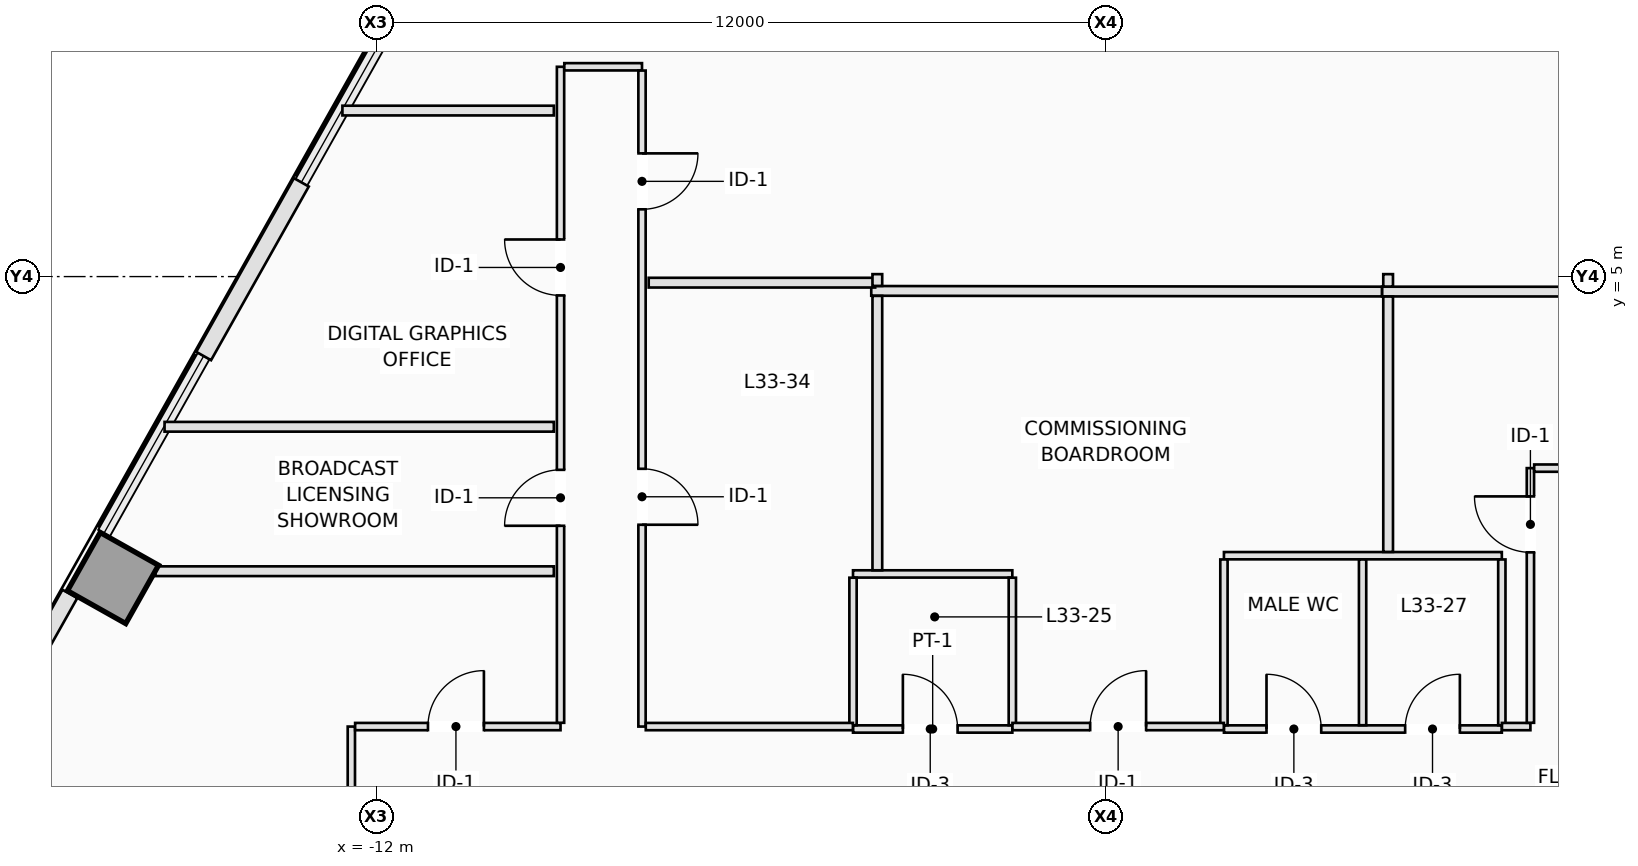
"""IFC4 building model, lengths in metres.
Left out: names, types, materials, properties, quantities, classifications, styles, units other than length and angle.
Written with IfcOpenShell. Run it as: python <this file> out.ifc"""

import sys

from ifc_helpers import new_model, si_unit, direction, frame, frame_2d, origin, origin_2d, place, context, subcontext, project, spatial, rectangle, extrude, element, fill, save


model = new_model("IFC4")
c1 = context("Model", 3, precision=1e-05, world=origin(), true_north=direction((0.0, 1.0)))
c2 = subcontext(c1, "Body", "Model", "MODEL_VIEW")
j1 = project(units=[si_unit("LENGTHUNIT", "METRE"), si_unit("PLANEANGLEUNIT", "RADIAN")], contexts=[c1])
p1 = place(None, origin())
s1 = spatial("IfcSite", under=j1, at=p1, CompositionType="ELEMENT")
p2 = place(p1, origin())
s2 = spatial("IfcBuilding", under=s1, at=p2, CompositionType="ELEMENT")
p3 = place(p2, frame((0.0, 0.0, 123.0)))
s3 = spatial("IfcBuildingStorey", under=s2, at=p3, CompositionType="ELEMENT", Elevation=123.0)
p4 = place(p3, frame((-16.33, 0.043, 0.0), z_axis=(0.0, 0.0, 1.0), x_axis=(-0.871575139605, 0.490261946333, 0.0)))
e1 = element("IfcColumn", 1, at=p4, inside=s3, PredefinedType="COLUMN", context=c2, shape_type="SweptSolid", body=[
    extrude(rectangle(XDim=1.1, YDim=1.1, at=origin_2d()), origin(), (0.0, 0.0, 1.0), 3.5),
])
p5 = place(p3, frame((-18.252, -2.374, 0.0), z_axis=(0.0, 0.0, 1.0), x_axis=(0.490186269625, 0.871617703509, 0.0)))
e2 = element("IfcWall", 2, at=p5, inside=s3, PredefinedType="STANDARD", context=c2, shape_type="SweptSolid", body=[
    extrude(rectangle(XDim=2.474, YDim=0.28, at=frame_2d((1.237, 0.0))), origin(), (0.0, 0.0, 1.0), 3.25),
])
p6 = place(p3, frame((-14.839, 3.694, 0.0), z_axis=(0.0, 0.0, 1.0), x_axis=(0.490310760781, 0.871547679626, 0.0)))
e3 = element("IfcWall", 3, at=p6, inside=s3, PredefinedType="STANDARD", context=c2, shape_type="SweptSolid", body=[
    extrude(rectangle(XDim=3.277, YDim=0.28, at=frame_2d((1.638, 0.0))), origin(), (0.0, 0.0, 1.0), 3.25),
])
p7 = place(p3, frame((-4.16, -2.44, 0.0), z_axis=(0.0, 0.0, 1.0), x_axis=(1.0, 0.0, 0.0)))
e4 = element("IfcWall", 4, at=p7, inside=s3, PredefinedType="PARTITIONING", context=c2, shape_type="SweptSolid", body=[
    extrude(rectangle(XDim=2.62, YDim=0.12, at=frame_2d((1.31, 0.0))), origin(), (0.0, 0.0, 1.0), 3.25),
])
p8 = place(p7, frame((0.82, 0.0, 0.0)))
e5 = element("IfcOpeningElement", 5, at=p8, cuts=e4, PredefinedType="OPENING", context=c2, shape_type="SweptSolid", body=[
    extrude(rectangle(XDim=0.9, YDim=2.12, at=frame_2d((0.45, 1.06))), frame((0.0, 0.07, 0.0), z_axis=(0.0, -1.0, 0.0), x_axis=(1.0, 0.0, 0.0)), (0.0, 0.0, 1.0), 0.14),
])
p9 = place(p3, frame((-4.16, 0.11, 0.0), z_axis=(0.0, 0.0, 1.0), x_axis=(1.0, 0.0, 0.0)))
e6 = element("IfcWall", 6, at=p9, inside=s3, PredefinedType="PARTITIONING", context=c2, shape_type="SweptSolid", body=[
    extrude(rectangle(XDim=2.62, YDim=0.12, at=frame_2d((1.31, 0.0))), origin(), (0.0, 0.0, 1.0), 2.891),
])
p10 = place(p3, frame((-4.16, -2.378, 0.0), z_axis=(0.0, 0.0, 1.0), x_axis=(0.0, 1.0, 0.0)))
e7 = element("IfcWall", 7, at=p10, inside=s3, PredefinedType="PARTITIONING", context=c2, shape_type="SweptSolid", body=[
    extrude(rectangle(XDim=2.426, YDim=0.12, at=frame_2d((1.213, 0.0))), origin(), (0.0, 0.0, 1.0), 2.648),
])
p11 = place(p3, frame((-1.54, -2.378, 0.0), z_axis=(0.0, 0.0, 1.0), x_axis=(0.0, 1.0, 0.0)))
e8 = element("IfcWall", 8, at=p11, inside=s3, PredefinedType="PARTITIONING", context=c2, shape_type="SweptSolid", body=[
    extrude(rectangle(XDim=2.426, YDim=0.12, at=frame_2d((1.213, 0.0))), origin(), (0.0, 0.0, 1.0), 3.25),
])
p12 = place(p3, frame((1.94, -2.44, 0.0), z_axis=(0.0, 0.0, 1.0), x_axis=(1.0, 0.0, 0.0)))
e9 = element("IfcWall", 9, at=p12, inside=s3, PredefinedType="PARTITIONING", context=c2, shape_type="SweptSolid", body=[
    extrude(rectangle(XDim=4.57, YDim=0.12, at=frame_2d((2.285, 0.0))), origin(), (0.0, 0.0, 1.0), 3.25),
])
p13 = place(p12, frame((0.7, 0.0, 0.0)))
e10 = element("IfcOpeningElement", 10, at=p13, cuts=e9, PredefinedType="OPENING", context=c2, shape_type="SweptSolid", body=[
    extrude(rectangle(XDim=0.9, YDim=2.12, at=frame_2d((0.45, 1.06))), frame((0.0, 0.07, 0.0), z_axis=(0.0, -1.0, 0.0), x_axis=(1.0, 0.0, 0.0)), (0.0, 0.0, 1.0), 0.14),
])
p14 = place(p12, frame((2.98, 0.0, 0.0)))
e11 = element("IfcOpeningElement", 11, at=p14, cuts=e9, PredefinedType="OPENING", context=c2, shape_type="SweptSolid", body=[
    extrude(rectangle(XDim=0.9, YDim=2.12, at=frame_2d((0.45, 1.06))), frame((0.0, 0.07, 0.0), z_axis=(0.0, -1.0, 0.0), x_axis=(1.0, 0.0, 0.0)), (0.0, 0.0, 1.0), 0.14),
])
p15 = place(p3, frame((1.94, 0.41, 0.0), z_axis=(0.0, 0.0, 1.0), x_axis=(1.0, 0.0, 0.0)))
e12 = element("IfcWall", 12, at=p15, inside=s3, PredefinedType="PARTITIONING", context=c2, shape_type="SweptSolid", body=[
    extrude(rectangle(XDim=4.57, YDim=0.12, at=frame_2d((2.285, 0.0))), origin(), (0.0, 0.0, 1.0), 3.25),
])
p16 = place(p3, frame((1.94, -2.378, 0.0), z_axis=(0.0, 0.0, 1.0), x_axis=(0.0, 1.0, 0.0)))
e13 = element("IfcWall", 13, at=p16, inside=s3, PredefinedType="PARTITIONING", context=c2, shape_type="SweptSolid", body=[
    extrude(rectangle(XDim=2.726, YDim=0.12, at=frame_2d((1.363, 0.0))), origin(), (0.0, 0.0, 1.0), 3.25),
])
p17 = place(p3, frame((4.22, -2.378, 0.0), z_axis=(0.0, 0.0, 1.0), x_axis=(0.0, 1.0, 0.0)))
e14 = element("IfcWall", 14, at=p17, inside=s3, PredefinedType="PARTITIONING", context=c2, shape_type="SweptSolid", body=[
    extrude(rectangle(XDim=2.726, YDim=0.12, at=frame_2d((1.363, 0.0))), origin(), (0.0, 0.0, 1.0), 2.648),
])
p18 = place(p3, frame((6.51, -2.378, 0.0), z_axis=(0.0, 0.0, 1.0), x_axis=(0.0, 1.0, 0.0)))
e15 = element("IfcWall", 15, at=p18, inside=s3, PredefinedType="PARTITIONING", context=c2, shape_type="SweptSolid", body=[
    extrude(rectangle(XDim=2.726, YDim=0.12, at=frame_2d((1.363, 0.0))), origin(), (0.0, 0.0, 1.0), 3.25),
])
p19 = place(p3, frame((-12.41, -4.248, 0.0), z_axis=(0.0, 0.0, 1.0), x_axis=(0.0, 1.0, 0.0)))
e16 = element("IfcWall", 16, at=p19, inside=s3, PredefinedType="PARTITIONING", context=c2, shape_type="SweptSolid", body=[
    extrude(rectangle(XDim=1.848, YDim=0.12, at=frame_2d((0.924, 0.0))), origin(), (0.0, 0.0, 1.0), 3.25),
])
p20 = place(p3, frame((-12.348, -2.4, 0.0), z_axis=(0.0, 0.0, 1.0), x_axis=(1.0, 0.0, 0.0)))
e17 = element("IfcWall", 17, at=p20, inside=s3, PredefinedType="PARTITIONING", context=c2, shape_type="SweptSolid", body=[
    extrude(rectangle(XDim=3.378, YDim=0.12, at=frame_2d((1.689, 0.0))), origin(), (0.0, 0.0, 1.0), 3.25),
])
p21 = place(p20, frame((1.198, 0.0, 0.0)))
e18 = element("IfcOpeningElement", 18, at=p21, cuts=e17, PredefinedType="OPENING", context=c2, shape_type="SweptSolid", body=[
    extrude(rectangle(XDim=0.92, YDim=2.12, at=frame_2d((0.46, 1.06))), frame((0.0, 0.07, 0.0), z_axis=(0.0, -1.0, 0.0), x_axis=(1.0, 0.0, 0.0)), (0.0, 0.0, 1.0), 0.14),
])
p22 = place(p3, frame((-8.97, -2.338, 0.0), z_axis=(0.0, 0.0, 1.0), x_axis=(0.0, 1.0, 0.0)))
e19 = element("IfcWall", 19, at=p22, inside=s3, PredefinedType="PARTITIONING", context=c2, shape_type="SweptSolid", body=[
    extrude(rectangle(XDim=10.788, YDim=0.12, at=frame_2d((5.394, 0.0))), origin(), (0.0, 0.0, 1.0), 3.25),
])
p23 = place(p22, frame((7.028, 0.0, 0.0)))
e20 = element("IfcOpeningElement", 20, at=p23, cuts=e19, PredefinedType="OPENING", context=c2, shape_type="SweptSolid", body=[
    extrude(rectangle(XDim=0.92, YDim=2.12, at=frame_2d((0.46, 1.06))), frame((0.0, 0.07, 0.0), z_axis=(0.0, -1.0, 0.0), x_axis=(1.0, 0.0, 0.0)), (0.0, 0.0, 1.0), 0.14),
])
p24 = place(p22, frame((3.24, 0.0, 0.0)))
e21 = element("IfcOpeningElement", 21, at=p24, cuts=e19, PredefinedType="OPENING", context=c2, shape_type="SweptSolid", body=[
    extrude(rectangle(XDim=0.92, YDim=2.12, at=frame_2d((0.46, 1.06))), frame((0.0, 0.07, 0.0), z_axis=(0.0, -1.0, 0.0), x_axis=(1.0, 0.0, 0.0)), (0.0, 0.0, 1.0), 0.14),
])
p25 = place(p3, frame((-8.908, 8.45, 0.0), z_axis=(0.0, 0.0, 1.0), x_axis=(1.0, 0.0, 0.0)))
e22 = element("IfcWall", 22, at=p25, inside=s3, PredefinedType="PARTITIONING", context=c2, shape_type="SweptSolid", body=[
    extrude(rectangle(XDim=1.278, YDim=0.12, at=frame_2d((0.639, 0.0))), origin(), (0.0, 0.0, 1.0), 3.25),
])
p26 = place(p3, frame((-7.63, 8.388, 0.0), z_axis=(0.0, 0.0, 1.0), x_axis=(0.0, -1.0, 0.0)))
e23 = element("IfcWall", 23, at=p26, inside=s3, PredefinedType="PARTITIONING", context=c2, shape_type="SweptSolid", body=[
    extrude(rectangle(XDim=10.788, YDim=0.12, at=frame_2d((5.394, 0.0))), origin(), (0.0, 0.0, 1.0), 3.25),
])
p27 = place(p26, frame((1.362, 0.0, 0.0)))
e24 = element("IfcOpeningElement", 24, at=p27, cuts=e23, PredefinedType="OPENING", context=c2, shape_type="SweptSolid", body=[
    extrude(rectangle(XDim=0.92, YDim=2.12, at=frame_2d((0.46, 1.06))), frame((0.0, 0.07, 0.0), z_axis=(0.0, -1.0, 0.0), x_axis=(1.0, 0.0, 0.0)), (0.0, 0.0, 1.0), 0.14),
])
p28 = place(p26, frame((6.549, 0.0, 0.0)))
e25 = element("IfcOpeningElement", 25, at=p28, cuts=e23, PredefinedType="OPENING", context=c2, shape_type="SweptSolid", body=[
    extrude(rectangle(XDim=0.92, YDim=2.12, at=frame_2d((0.46, 1.06))), frame((0.0, 0.07, 0.0), z_axis=(0.0, -1.0, 0.0), x_axis=(1.0, 0.0, 0.0)), (0.0, 0.0, 1.0), 0.14),
])
p29 = place(p3, frame((-7.568, -2.4, 0.0), z_axis=(0.0, 0.0, 1.0), x_axis=(1.0, 0.0, 0.0)))
e26 = element("IfcWall", 26, at=p29, inside=s3, PredefinedType="PARTITIONING", context=c2, shape_type="SweptSolid", body=[
    extrude(rectangle(XDim=3.406, YDim=0.12, at=frame_2d((1.703, 0.0))), origin(), (0.0, 0.0, 1.0), 3.25),
])
p30 = place(p3, frame((-1.538, -2.4, 0.0), z_axis=(0.0, 0.0, 1.0), x_axis=(1.0, 0.0, 0.0)))
e27 = element("IfcWall", 27, at=p30, inside=s3, PredefinedType="PARTITIONING", context=c2, shape_type="SweptSolid", body=[
    extrude(rectangle(XDim=3.476, YDim=0.12, at=frame_2d((1.738, 0.0))), origin(), (0.0, 0.0, 1.0), 3.25),
])
p31 = place(p30, frame((1.278, 0.0, 0.0)))
e28 = element("IfcOpeningElement", 28, at=p31, cuts=e27, PredefinedType="OPENING", context=c2, shape_type="SweptSolid", body=[
    extrude(rectangle(XDim=0.92, YDim=2.12, at=frame_2d((0.46, 1.06))), frame((0.0, 0.07, 0.0), z_axis=(0.0, -1.0, 0.0), x_axis=(1.0, 0.0, 0.0)), (0.0, 0.0, 1.0), 0.14),
])
p32 = place(p3, frame((6.512, -2.4, 0.0), z_axis=(0.0, 0.0, 1.0), x_axis=(1.0, 0.0, 0.0)))
e29 = element("IfcWall", 29, at=p32, inside=s3, PredefinedType="PARTITIONING", context=c2, shape_type="SweptSolid", body=[
    extrude(rectangle(XDim=0.468, YDim=0.12, at=frame_2d((0.234, 0.0))), origin(), (0.0, 0.0, 1.0), 3.25),
])
p33 = place(p3, frame((6.98, -2.338, 0.0), z_axis=(0.0, 0.0, 1.0), x_axis=(0.0, 1.0, 0.0)))
e30 = element("IfcWall", 30, at=p33, inside=s3, PredefinedType="PARTITIONING", context=c2, shape_type="SweptSolid", body=[
    extrude(rectangle(XDim=4.188, YDim=0.12, at=frame_2d((2.094, 0.0))), origin(), (0.0, 0.0, 1.0), 3.25),
])
p34 = place(p33, frame((2.803, 0.0, 0.0)))
e31 = element("IfcOpeningElement", 31, at=p34, cuts=e30, PredefinedType="OPENING", context=c2, shape_type="SweptSolid", body=[
    extrude(rectangle(XDim=0.92, YDim=2.12, at=frame_2d((0.46, 1.06))), frame((0.0, 0.07, 0.0), z_axis=(0.0, -1.0, 0.0), x_axis=(1.0, 0.0, 0.0)), (0.0, 0.0, 1.0), 0.14),
])
p35 = place(p3, frame((7.042, 1.85, 0.0), z_axis=(0.0, 0.0, 1.0), x_axis=(1.0, 0.0, 0.0)))
e32 = element("IfcWall", 32, at=p35, inside=s3, PredefinedType="PARTITIONING", context=c2, shape_type="SweptSolid", body=[
    extrude(rectangle(XDim=1.278, YDim=0.12, at=frame_2d((0.639, 0.0))), origin(), (0.0, 0.0, 1.0), 3.25),
])
p36 = place(p3, frame((-9.08, 7.73, 0.0), z_axis=(0.0, 0.0, 1.0), x_axis=(-1.0, 0.0, 0.0)))
e33 = element("IfcWall", 33, at=p36, inside=s3, PredefinedType="PARTITIONING", context=c2, shape_type="SweptSolid", body=[
    extrude(rectangle(XDim=3.477, YDim=0.16, at=frame_2d((1.738, 0.0))), origin(), (0.0, 0.0, 1.0), 3.25),
])
p37 = place(p3, frame((14.082, 4.75, 0.0), z_axis=(0.0, 0.0, 1.0), x_axis=(-0.999999926346, 0.000383808375, 0.0)))
e34 = element("IfcWall", 34, at=p37, inside=s3, PredefinedType="PARTITIONING", context=c2, shape_type="SweptSolid", body=[
    extrude(rectangle(XDim=9.542, YDim=0.16, at=frame_2d((4.771, 0.0))), origin(), (0.0, 0.0, 1.0), 3.25),
])
p38 = place(p3, frame((4.538, 4.754, 0.0), z_axis=(0.0, 0.0, 1.0), x_axis=(-0.999999181944, 0.001279105904, 0.0)))
e35 = element("IfcWall", 35, at=p38, inside=s3, PredefinedType="PARTITIONING", context=c2, shape_type="SweptSolid", body=[
    extrude(rectangle(XDim=8.398, YDim=0.16, at=frame_2d((4.199, 0.0))), origin(), (0.0, 0.0, 1.0), 3.25),
])
p39 = place(p3, frame((-3.795, 4.9, 0.0), z_axis=(0.0, 0.0, 1.0), x_axis=(-1.0, 0.0, 0.0)))
e36 = element("IfcWall", 36, at=p39, inside=s3, PredefinedType="PARTITIONING", context=c2, shape_type="SweptSolid", body=[
    extrude(rectangle(XDim=3.725, YDim=0.16, at=frame_2d((1.862, 0.0))), origin(), (0.0, 0.0, 1.0), 2.891),
])
p40 = place(p3, frame((-9.08, 2.53, 0.0), z_axis=(0.0, 0.0, 1.0), x_axis=(-1.0, 0.0, 0.0)))
e37 = element("IfcWall", 37, at=p40, inside=s3, PredefinedType="PARTITIONING", context=c2, shape_type="SweptSolid", body=[
    extrude(rectangle(XDim=6.402, YDim=0.16, at=frame_2d((3.201, 0.0))), origin(), (0.0, 0.0, 1.0), 3.25),
])
p41 = place(p3, frame((4.64, 0.472, 0.0), z_axis=(0.0, 0.0, 1.0), x_axis=(0.0, 1.0, 0.0)))
e38 = element("IfcWall", 38, at=p41, inside=s3, PredefinedType="PARTITIONING", context=c2, shape_type="SweptSolid", body=[
    extrude(rectangle(XDim=4.2, YDim=0.16, at=frame_2d((2.1, 0.0))), origin(), (0.0, 0.0, 1.0), 3.25),
])
p42 = place(p3, frame((4.64, 4.836, 0.0), z_axis=(0.0, 0.0, 1.0), x_axis=(0.0, 1.0, 0.0)))
e39 = element("IfcWall", 39, at=p42, inside=s3, PredefinedType="PARTITIONING", context=c2, shape_type="SweptSolid", body=[
    extrude(rectangle(XDim=0.204, YDim=0.16, at=frame_2d((0.102, 0.0))), origin(), (0.0, 0.0, 1.0), 3.25),
])
p43 = place(p3, frame((-3.76, 0.17, 0.0), z_axis=(0.0, 0.0, 1.0), x_axis=(0.0, 1.0, 0.0)))
e40 = element("IfcWall", 40, at=p43, inside=s3, PredefinedType="PARTITIONING", context=c2, shape_type="SweptSolid", body=[
    extrude(rectangle(XDim=4.513, YDim=0.16, at=frame_2d((2.256, 0.0))), origin(), (0.0, 0.0, 1.0), 3.25),
])
p44 = place(p3, frame((-3.76, 4.847, 0.0), z_axis=(0.0, 0.0, 1.0), x_axis=(0.0, 1.0, 0.0)))
e41 = element("IfcWall", 41, at=p44, inside=s3, PredefinedType="PARTITIONING", context=c2, shape_type="SweptSolid", body=[
    extrude(rectangle(XDim=0.193, YDim=0.16, at=frame_2d((0.097, 0.0))), origin(), (0.0, 0.0, 1.0), 3.25),
])
p45 = place(p3, frame((-9.08, 0.155, 0.0), z_axis=(0.0, 0.0, 1.0), x_axis=(-1.0, 0.0, 0.0)))
e42 = element("IfcWall", 42, at=p45, inside=s3, PredefinedType="PARTITIONING", context=c2, shape_type="SweptSolid", body=[
    extrude(rectangle(XDim=6.554, YDim=0.16, at=frame_2d((3.277, 0.0))), origin(), (0.0, 0.0, 1.0), 3.25),
])
p46 = place(p8, origin())
e43 = element("IfcDoor", 43, at=p46, inside=s3, OperationType="SINGLE_SWING_LEFT", PredefinedType="DOOR", context=c2, shape_type="SweptSolid", body=[
    extrude(rectangle(XDim=0.9, YDim=2.12, at=frame_2d((0.45, 1.06))), frame((0.0, 0.025, 0.0), z_axis=(0.0, -1.0, 0.0), x_axis=(1.0, 0.0, 0.0)), (0.0, 0.0, 1.0), 0.05),
])
fill(e5, e43)
p47 = place(p13, origin())
e44 = element("IfcDoor", 44, at=p47, inside=s3, OperationType="SINGLE_SWING_LEFT", PredefinedType="DOOR", context=c2, shape_type="SweptSolid", body=[
    extrude(rectangle(XDim=0.9, YDim=2.12, at=frame_2d((0.45, 1.06))), frame((0.0, 0.025, 0.0), z_axis=(0.0, -1.0, 0.0), x_axis=(1.0, 0.0, 0.0)), (0.0, 0.0, 1.0), 0.05),
])
fill(e10, e44)
p48 = place(p14, origin())
e45 = element("IfcDoor", 45, at=p48, inside=s3, OperationType="SINGLE_SWING_RIGHT", PredefinedType="DOOR", context=c2, shape_type="SweptSolid", body=[
    extrude(rectangle(XDim=0.9, YDim=2.12, at=frame_2d((0.45, 1.06))), frame((0.0, 0.025, 0.0), z_axis=(0.0, -1.0, 0.0), x_axis=(1.0, 0.0, 0.0)), (0.0, 0.0, 1.0), 0.05),
])
fill(e11, e45)
p49 = place(p27, origin())
e46 = element("IfcDoor", 46, at=p49, inside=s3, OperationType="SINGLE_SWING_LEFT", PredefinedType="DOOR", context=c2, shape_type="SweptSolid", body=[
    extrude(rectangle(XDim=0.92, YDim=2.12, at=frame_2d((0.46, 1.06))), frame((0.0, 0.025, 0.0), z_axis=(0.0, -1.0, 0.0), x_axis=(1.0, 0.0, 0.0)), (0.0, 0.0, 1.0), 0.05),
])
fill(e24, e46)
p50 = place(p23, origin())
e47 = element("IfcDoor", 47, at=p50, inside=s3, OperationType="SINGLE_SWING_RIGHT", PredefinedType="DOOR", context=c2, shape_type="SweptSolid", body=[
    extrude(rectangle(XDim=0.92, YDim=2.12, at=frame_2d((0.46, 1.06))), frame((0.0, 0.025, 0.0), z_axis=(0.0, -1.0, 0.0), x_axis=(1.0, 0.0, 0.0)), (0.0, 0.0, 1.0), 0.05),
])
fill(e20, e47)
p51 = place(p34, origin())
e48 = element("IfcDoor", 48, at=p51, inside=s3, OperationType="SINGLE_SWING_RIGHT", PredefinedType="DOOR", context=c2, shape_type="SweptSolid", body=[
    extrude(rectangle(XDim=0.92, YDim=2.12, at=frame_2d((0.46, 1.06))), frame((0.0, 0.025, 0.0), z_axis=(0.0, -1.0, 0.0), x_axis=(1.0, 0.0, 0.0)), (0.0, 0.0, 1.0), 0.05),
])
fill(e31, e48)
p52 = place(p31, origin())
e49 = element("IfcDoor", 49, at=p52, inside=s3, OperationType="SINGLE_SWING_RIGHT", PredefinedType="DOOR", context=c2, shape_type="SweptSolid", body=[
    extrude(rectangle(XDim=0.92, YDim=2.12, at=frame_2d((0.46, 1.06))), frame((0.0, 0.025, 0.0), z_axis=(0.0, -1.0, 0.0), x_axis=(1.0, 0.0, 0.0)), (0.0, 0.0, 1.0), 0.05),
])
fill(e28, e49)
p53 = place(p24, origin())
e50 = element("IfcDoor", 50, at=p53, inside=s3, OperationType="SINGLE_SWING_LEFT", PredefinedType="DOOR", context=c2, shape_type="SweptSolid", body=[
    extrude(rectangle(XDim=0.92, YDim=2.12, at=frame_2d((0.46, 1.06))), frame((0.0, 0.025, 0.0), z_axis=(0.0, -1.0, 0.0), x_axis=(1.0, 0.0, 0.0)), (0.0, 0.0, 1.0), 0.05),
])
fill(e21, e50)
p54 = place(p28, origin())
e51 = element("IfcDoor", 51, at=p54, inside=s3, OperationType="SINGLE_SWING_RIGHT", PredefinedType="DOOR", context=c2, shape_type="SweptSolid", body=[
    extrude(rectangle(XDim=0.92, YDim=2.12, at=frame_2d((0.46, 1.06))), frame((0.0, 0.025, 0.0), z_axis=(0.0, -1.0, 0.0), x_axis=(1.0, 0.0, 0.0)), (0.0, 0.0, 1.0), 0.05),
])
fill(e25, e51)
p55 = place(p21, origin())
e52 = element("IfcDoor", 52, at=p55, inside=s3, OperationType="SINGLE_SWING_RIGHT", PredefinedType="DOOR", context=c2, shape_type="SweptSolid", body=[
    extrude(rectangle(XDim=0.92, YDim=2.12, at=frame_2d((0.46, 1.06))), frame((0.0, 0.025, 0.0), z_axis=(0.0, -1.0, 0.0), x_axis=(1.0, 0.0, 0.0)), (0.0, 0.0, 1.0), 0.05),
])
fill(e18, e52)
save(model, sys.argv[1])
